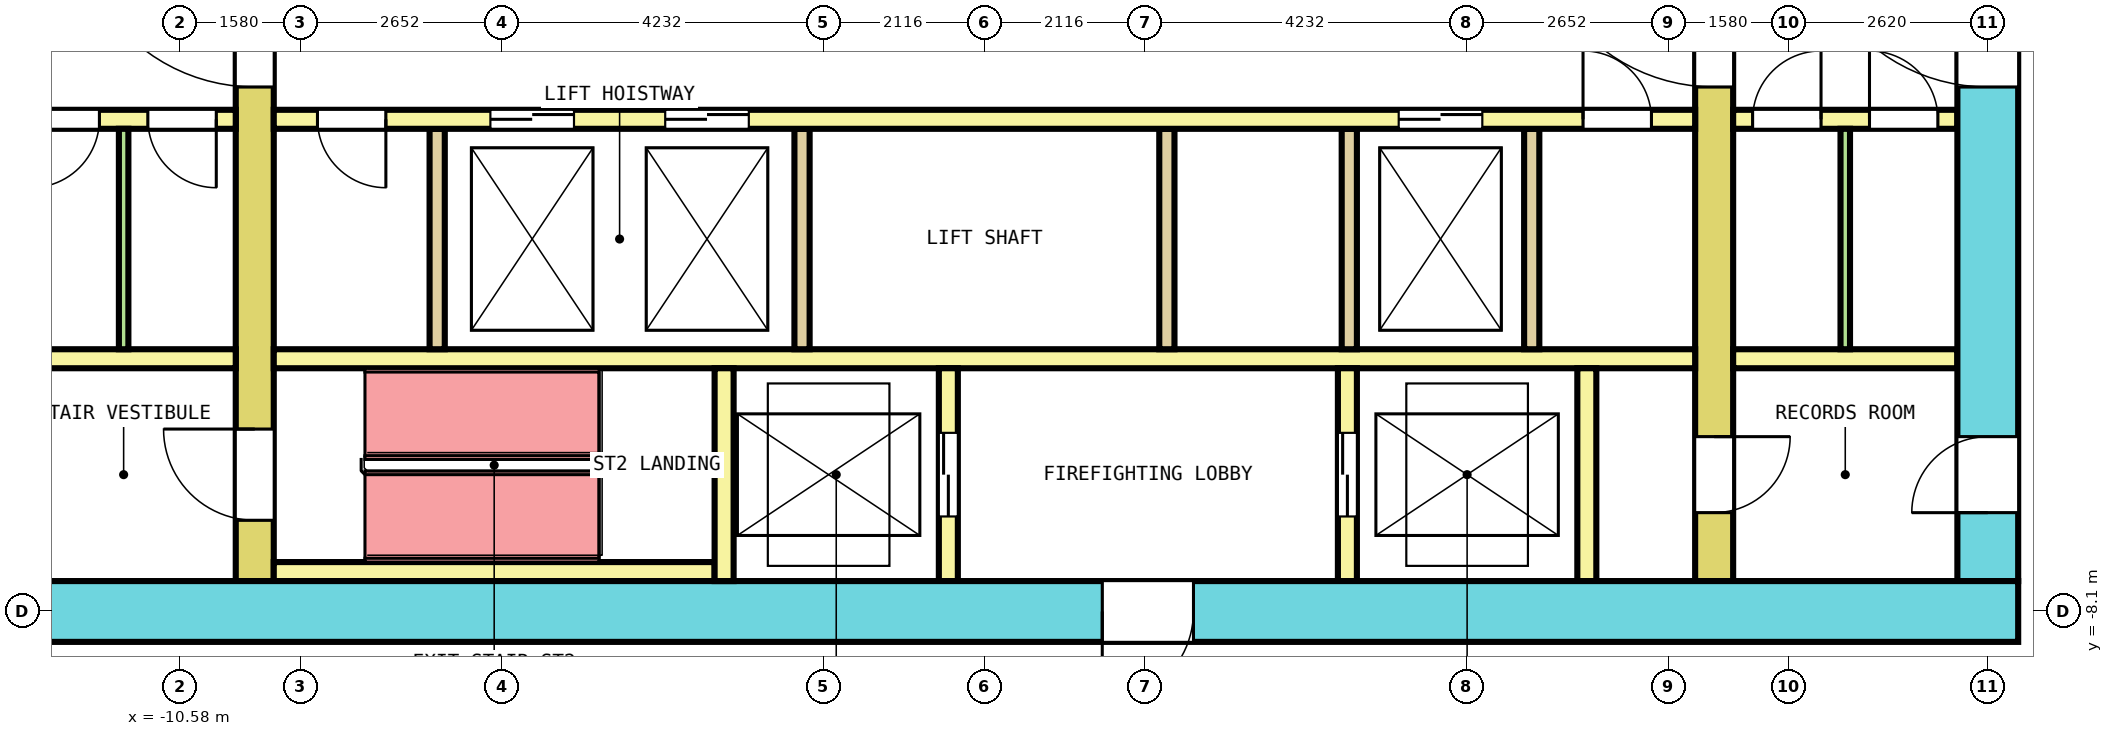
"""IFC4 building model, lengths in metres.
Left out: names, types, materials, properties, quantities, classifications, styles, units other than length and angle.
Written with IfcOpenShell. Run it as: python <this file> out.ifc"""

import sys

from ifc_helpers import new_model, si_unit, direction, frame, frame_2d, origin, place, context, subcontext, project, spatial, rectangle, extrude, element, fill, save


model = new_model("IFC4")
c1 = context("Model", 3, precision=1e-05, world=origin(), true_north=direction((0.0, 1.0)))
c2 = subcontext(c1, "Body", "Model", "MODEL_VIEW")
j1 = project(units=[si_unit("LENGTHUNIT", "METRE"), si_unit("PLANEANGLEUNIT", "RADIAN")], contexts=[c1])
p1 = place(None, origin())
s1 = spatial("IfcSite", under=j1, at=p1, CompositionType="ELEMENT")
p2 = place(p1, origin())
s2 = spatial("IfcBuilding", under=s1, at=p2, CompositionType="ELEMENT")
p3 = place(p2, frame((0.0, 0.0, 122.0)))
s3 = spatial("IfcBuildingStorey", under=s2, at=p3, CompositionType="ELEMENT", Elevation=122.0)
p4 = place(p3, frame((-13.6, -8.1, 0.0), z_axis=(0.0, 0.0, 1.0), x_axis=(1.0, 0.0, 0.0)))
e1 = element("IfcWall", 1, at=p4, inside=s3, PredefinedType="SHEAR", context=c2, shape_type="SweptSolid", body=[
    extrude(rectangle(XDim=27.2, YDim=0.8, at=frame_2d((13.6, 0.0))), origin(), (0.0, 0.0, 1.0), 4.1),
])
p5 = place(p4, frame((15.15, 0.0, 0.0)))
e2 = element("IfcOpeningElement", 2, at=p5, cuts=e1, PredefinedType="OPENING", context=c2, shape_type="SweptSolid", body=[
    extrude(rectangle(XDim=1.2, YDim=2.1, at=frame_2d((0.6, 1.05))), frame((0.0, 0.41, 0.0), z_axis=(0.0, -1.0, 0.0), x_axis=(1.0, 0.0, 0.0)), (0.0, 0.0, 1.0), 0.82),
])
p6 = place(p3, frame((13.2, -7.7, 0.0), z_axis=(0.0, 0.0, 1.0), x_axis=(0.0, 1.0, 0.0)))
e3 = element("IfcWall", 3, at=p6, inside=s3, PredefinedType="SHEAR", context=c2, shape_type="SweptSolid", body=[
    extrude(rectangle(XDim=15.4, YDim=0.8, at=frame_2d((7.7, 0.0))), origin(), (0.0, 0.0, 1.0), 4.1),
])
p7 = place(p6, frame((6.5, 0.0, 0.0)))
e4 = element("IfcOpeningElement", 4, at=p7, cuts=e3, PredefinedType="OPENING", context=c2, shape_type="SweptSolid", body=[
    extrude(rectangle(XDim=2.4, YDim=2.1, at=frame_2d((1.2, 1.05))), frame((0.0, 0.41, 0.0), z_axis=(0.0, -1.0, 0.0), x_axis=(1.0, 0.0, 0.0)), (0.0, 0.0, 1.0), 0.82),
])
p8 = place(p6, frame((13.4, 0.0, 0.0)))
e5 = element("IfcOpeningElement", 5, at=p8, cuts=e3, PredefinedType="OPENING", context=c2, shape_type="SweptSolid", body=[
    extrude(rectangle(XDim=1.2, YDim=2.1, at=frame_2d((0.6, 1.05))), frame((0.0, 0.41, 0.0), z_axis=(0.0, -1.0, 0.0), x_axis=(1.0, 0.0, 0.0)), (0.0, 0.0, 1.0), 0.82),
])
p9 = place(p6, frame((0.9, 0.0, 0.0)))
e6 = element("IfcOpeningElement", 6, at=p9, cuts=e3, PredefinedType="OPENING", context=c2, shape_type="SweptSolid", body=[
    extrude(rectangle(XDim=1.0, YDim=2.1, at=frame_2d((0.5, 1.05))), frame((0.0, 0.41, 0.0), z_axis=(0.0, -1.0, 0.0), x_axis=(1.0, 0.0, 0.0)), (0.0, 0.0, 1.0), 0.82),
])
p10 = place(p3, frame((-9.6, -7.7, 0.0), z_axis=(0.0, 0.0, 1.0), x_axis=(0.0, 1.0, 0.0)))
e7 = element("IfcWall", 7, at=p10, inside=s3, PredefinedType="SHEAR", context=c2, shape_type="SweptSolid", body=[
    extrude(rectangle(XDim=15.4, YDim=0.5, at=frame_2d((7.7, 0.0))), origin(), (0.0, 0.0, 1.0), 4.1),
])
p11 = place(p10, frame((6.5, 0.0, 0.0)))
e8 = element("IfcOpeningElement", 8, at=p11, cuts=e7, PredefinedType="OPENING", context=c2, shape_type="SweptSolid", body=[
    extrude(rectangle(XDim=2.4, YDim=2.1, at=frame_2d((1.2, 1.05))), frame((0.0, 0.26, 0.0), z_axis=(0.0, -1.0, 0.0), x_axis=(1.0, 0.0, 0.0)), (0.0, 0.0, 1.0), 0.52),
])
p12 = place(p10, frame((13.4, 0.0, 0.0)))
e9 = element("IfcOpeningElement", 9, at=p12, cuts=e7, PredefinedType="OPENING", context=c2, shape_type="SweptSolid", body=[
    extrude(rectangle(XDim=1.2, YDim=2.1, at=frame_2d((0.6, 1.05))), frame((0.0, 0.26, 0.0), z_axis=(0.0, -1.0, 0.0), x_axis=(1.0, 0.0, 0.0)), (0.0, 0.0, 1.0), 0.52),
])
p13 = place(p10, frame((0.8, 0.0, 0.0)))
e10 = element("IfcOpeningElement", 10, at=p13, cuts=e7, PredefinedType="OPENING", context=c2, shape_type="SweptSolid", body=[
    extrude(rectangle(XDim=1.2, YDim=2.1, at=frame_2d((0.6, 1.05))), frame((0.0, 0.26, 0.0), z_axis=(0.0, -1.0, 0.0), x_axis=(1.0, 0.0, 0.0)), (0.0, 0.0, 1.0), 0.52),
])
p14 = place(p3, frame((9.6, -7.7, 0.0), z_axis=(0.0, 0.0, 1.0), x_axis=(0.0, 1.0, 0.0)))
e11 = element("IfcWall", 11, at=p14, inside=s3, PredefinedType="SHEAR", context=c2, shape_type="SweptSolid", body=[
    extrude(rectangle(XDim=15.4, YDim=0.5, at=frame_2d((7.7, 0.0))), origin(), (0.0, 0.0, 1.0), 4.1),
])
p15 = place(p14, frame((6.5, 0.0, 0.0)))
e12 = element("IfcOpeningElement", 12, at=p15, cuts=e11, PredefinedType="OPENING", context=c2, shape_type="SweptSolid", body=[
    extrude(rectangle(XDim=2.4, YDim=2.1, at=frame_2d((1.2, 1.05))), frame((0.0, 0.26, 0.0), z_axis=(0.0, -1.0, 0.0), x_axis=(1.0, 0.0, 0.0)), (0.0, 0.0, 1.0), 0.52),
])
p16 = place(p14, frame((13.4, 0.0, 0.0)))
e13 = element("IfcOpeningElement", 13, at=p16, cuts=e11, PredefinedType="OPENING", context=c2, shape_type="SweptSolid", body=[
    extrude(rectangle(XDim=1.2, YDim=2.1, at=frame_2d((0.6, 1.05))), frame((0.0, 0.26, 0.0), z_axis=(0.0, -1.0, 0.0), x_axis=(1.0, 0.0, 0.0)), (0.0, 0.0, 1.0), 0.52),
])
p17 = place(p14, frame((0.9, 0.0, 0.0)))
e14 = element("IfcOpeningElement", 14, at=p17, cuts=e11, PredefinedType="OPENING", context=c2, shape_type="SweptSolid", body=[
    extrude(rectangle(XDim=1.0, YDim=2.1, at=frame_2d((0.5, 1.05))), frame((0.0, 0.26, 0.0), z_axis=(0.0, -1.0, 0.0), x_axis=(1.0, 0.0, 0.0)), (0.0, 0.0, 1.0), 0.52),
])
p18 = place(p3, frame((-12.8, -1.625, 0.0), z_axis=(0.0, 0.0, 1.0), x_axis=(1.0, 0.0, 0.0)))
e15 = element("IfcWall", 15, at=p18, inside=s3, PredefinedType="SOLIDWALL", context=c2, shape_type="SweptSolid", body=[
    extrude(rectangle(XDim=2.95, YDim=0.25, at=frame_2d((1.475, 0.0))), origin(), (0.0, 0.0, 1.0), 4.1),
])
p19 = place(p18, frame((0.256, 0.0, 0.0)))
e16 = element("IfcOpeningElement", 16, at=p19, cuts=e15, PredefinedType="OPENING", context=c2, shape_type="SweptSolid", body=[
    extrude(rectangle(XDim=0.9, YDim=2.1, at=frame_2d((0.45, 1.05))), frame((0.0, 0.135, 0.0), z_axis=(0.0, -1.0, 0.0), x_axis=(1.0, 0.0, 0.0)), (0.0, 0.0, 1.0), 0.27),
])
p20 = place(p18, frame((1.794, 0.0, 0.0)))
e17 = element("IfcOpeningElement", 17, at=p20, cuts=e15, PredefinedType="OPENING", context=c2, shape_type="SweptSolid", body=[
    extrude(rectangle(XDim=0.9, YDim=2.1, at=frame_2d((0.45, 1.05))), frame((0.0, 0.135, 0.0), z_axis=(0.0, -1.0, 0.0), x_axis=(1.0, 0.0, 0.0)), (0.0, 0.0, 1.0), 0.27),
])
p21 = place(p3, frame((-9.35, -1.625, 0.0), z_axis=(0.0, 0.0, 1.0), x_axis=(1.0, 0.0, 0.0)))
e18 = element("IfcWall", 18, at=p21, inside=s3, PredefinedType="SOLIDWALL", context=c2, shape_type="SweptSolid", body=[
    extrude(rectangle(XDim=18.7, YDim=0.25, at=frame_2d((9.35, 0.0))), origin(), (0.0, 0.0, 1.0), 4.1),
])
p22 = place(p21, frame((2.85, 0.0, 0.0)))
e19 = element("IfcOpeningElement", 19, at=p22, cuts=e18, PredefinedType="OPENING", context=c2, shape_type="SweptSolid", body=[
    extrude(rectangle(XDim=1.1, YDim=2.1, at=frame_2d((0.55, 1.05))), frame((0.0, 0.135, 0.0), z_axis=(0.0, -1.0, 0.0), x_axis=(1.0, 0.0, 0.0)), (0.0, 0.0, 1.0), 0.27),
])
p23 = place(p21, frame((5.15, 0.0, 0.0)))
e20 = element("IfcOpeningElement", 20, at=p23, cuts=e18, PredefinedType="OPENING", context=c2, shape_type="SweptSolid", body=[
    extrude(rectangle(XDim=1.1, YDim=2.1, at=frame_2d((0.55, 1.05))), frame((0.0, 0.135, 0.0), z_axis=(0.0, -1.0, 0.0), x_axis=(1.0, 0.0, 0.0)), (0.0, 0.0, 1.0), 0.27),
])
p24 = place(p21, frame((14.8, 0.0, 0.0)))
e21 = element("IfcOpeningElement", 21, at=p24, cuts=e18, PredefinedType="OPENING", context=c2, shape_type="SweptSolid", body=[
    extrude(rectangle(XDim=1.1, YDim=2.1, at=frame_2d((0.55, 1.05))), frame((0.0, 0.135, 0.0), z_axis=(0.0, -1.0, 0.0), x_axis=(1.0, 0.0, 0.0)), (0.0, 0.0, 1.0), 0.27),
])
p25 = place(p21, frame((0.575, 0.0, 0.0)))
e22 = element("IfcOpeningElement", 22, at=p25, cuts=e18, PredefinedType="OPENING", context=c2, shape_type="SweptSolid", body=[
    extrude(rectangle(XDim=0.9, YDim=2.1, at=frame_2d((0.45, 1.05))), frame((0.0, 0.135, 0.0), z_axis=(0.0, -1.0, 0.0), x_axis=(1.0, 0.0, 0.0)), (0.0, 0.0, 1.0), 0.27),
])
p26 = place(p21, frame((17.225, 0.0, 0.0)))
e23 = element("IfcOpeningElement", 23, at=p26, cuts=e18, PredefinedType="OPENING", context=c2, shape_type="SweptSolid", body=[
    extrude(rectangle(XDim=0.9, YDim=2.1, at=frame_2d((0.45, 1.05))), frame((0.0, 0.135, 0.0), z_axis=(0.0, -1.0, 0.0), x_axis=(1.0, 0.0, 0.0)), (0.0, 0.0, 1.0), 0.27),
])
p27 = place(p3, frame((9.85, -1.625, 0.0), z_axis=(0.0, 0.0, 1.0), x_axis=(1.0, 0.0, 0.0)))
e24 = element("IfcWall", 24, at=p27, inside=s3, PredefinedType="SOLIDWALL", context=c2, shape_type="SweptSolid", body=[
    extrude(rectangle(XDim=2.95, YDim=0.25, at=frame_2d((1.475, 0.0))), origin(), (0.0, 0.0, 1.0), 4.1),
])
p28 = place(p27, frame((0.256, 0.0, 0.0)))
e25 = element("IfcOpeningElement", 25, at=p28, cuts=e24, PredefinedType="OPENING", context=c2, shape_type="SweptSolid", body=[
    extrude(rectangle(XDim=0.9, YDim=2.1, at=frame_2d((0.45, 1.05))), frame((0.0, 0.135, 0.0), z_axis=(0.0, -1.0, 0.0), x_axis=(1.0, 0.0, 0.0)), (0.0, 0.0, 1.0), 0.27),
])
p29 = place(p27, frame((1.794, 0.0, 0.0)))
e26 = element("IfcOpeningElement", 26, at=p29, cuts=e24, PredefinedType="OPENING", context=c2, shape_type="SweptSolid", body=[
    extrude(rectangle(XDim=0.9, YDim=2.1, at=frame_2d((0.45, 1.05))), frame((0.0, 0.135, 0.0), z_axis=(0.0, -1.0, 0.0), x_axis=(1.0, 0.0, 0.0)), (0.0, 0.0, 1.0), 0.27),
])
p30 = place(p3, frame((-12.8, -4.775, 0.0), z_axis=(0.0, 0.0, 1.0), x_axis=(1.0, 0.0, 0.0)))
e27 = element("IfcWall", 27, at=p30, inside=s3, PredefinedType="SOLIDWALL", context=c2, shape_type="SweptSolid", body=[
    extrude(rectangle(XDim=2.95, YDim=0.25, at=frame_2d((1.475, 0.0))), origin(), (0.0, 0.0, 1.0), 4.1),
])
p31 = place(p3, frame((-9.35, -4.775, 0.0), z_axis=(0.0, 0.0, 1.0), x_axis=(1.0, 0.0, 0.0)))
e28 = element("IfcWall", 28, at=p31, inside=s3, PredefinedType="SOLIDWALL", context=c2, shape_type="SweptSolid", body=[
    extrude(rectangle(XDim=18.7, YDim=0.25, at=frame_2d((9.35, 0.0))), origin(), (0.0, 0.0, 1.0), 4.1),
])
p32 = place(p3, frame((9.85, -4.775, 0.0), z_axis=(0.0, 0.0, 1.0), x_axis=(1.0, 0.0, 0.0)))
e29 = element("IfcWall", 29, at=p32, inside=s3, PredefinedType="SOLIDWALL", context=c2, shape_type="SweptSolid", body=[
    extrude(rectangle(XDim=2.95, YDim=0.25, at=frame_2d((1.475, 0.0))), origin(), (0.0, 0.0, 1.0), 4.1),
])
for number, where, z_axis, x_axis in (
    (30, (-7.2, -4.65, 0.0), (0.0, 0.0, 1.0), (0.0, 1.0, 0.0)),
    (31, (-2.4, -4.65, 0.0), (0.0, 0.0, 1.0), (0.0, 1.0, 0.0)),
    (32, (2.4, -4.65, 0.0), (0.0, 0.0, 1.0), (0.0, 1.0, 0.0)),
    (33, (4.8, -4.65, 0.0), (0.0, 0.0, 1.0), (0.0, 1.0, 0.0)),
    (34, (7.2, -4.65, 0.0), (0.0, 0.0, 1.0), (0.0, 1.0, 0.0)),
):
    element("IfcWall", number, at=place(p3, frame(where, z_axis=z_axis, x_axis=x_axis)), inside=s3, PredefinedType="SOLIDWALL", context=c2, shape_type="SweptSolid", body=[
        extrude(rectangle(XDim=2.9, YDim=0.2, at=frame_2d((1.45, 0.0))), origin(), (0.0, 0.0, 1.0), 4.1),
    ])
p33 = place(p3, frame((-9.35, -7.575, 0.0), z_axis=(0.0, 0.0, 1.0), x_axis=(1.0, 0.0, 0.0)))
e35 = element("IfcWall", 35, at=p33, inside=s3, PredefinedType="SOLIDWALL", context=c2, shape_type="SweptSolid", body=[
    extrude(rectangle(XDim=5.8, YDim=0.25, at=frame_2d((2.9, 0.0))), origin(), (0.0, 0.0, 1.0), 4.1),
])
p34 = place(p3, frame((-3.425, -7.7, 0.0), z_axis=(0.0, 0.0, 1.0), x_axis=(0.0, 1.0, 0.0)))
e36 = element("IfcWall", 36, at=p34, inside=s3, PredefinedType="SOLIDWALL", context=c2, shape_type="SweptSolid", body=[
    extrude(rectangle(XDim=2.8, YDim=0.25, at=frame_2d((1.4, 0.0))), origin(), (0.0, 0.0, 1.0), 4.1),
])
p35 = place(p3, frame((-0.475, -7.7, 0.0), z_axis=(0.0, 0.0, 1.0), x_axis=(0.0, 1.0, 0.0)))
e37 = element("IfcWall", 37, at=p35, inside=s3, PredefinedType="SOLIDWALL", context=c2, shape_type="SweptSolid", body=[
    extrude(rectangle(XDim=2.8, YDim=0.25, at=frame_2d((1.4, 0.0))), origin(), (0.0, 0.0, 1.0), 4.1),
])
p36 = place(p35, frame((0.85, 0.0, 0.0)))
e38 = element("IfcOpeningElement", 38, at=p36, cuts=e37, PredefinedType="OPENING", context=c2, shape_type="SweptSolid", body=[
    extrude(rectangle(XDim=1.1, YDim=2.1, at=frame_2d((0.55, 1.05))), frame((0.0, 0.135, 0.0), z_axis=(0.0, -1.0, 0.0), x_axis=(1.0, 0.0, 0.0)), (0.0, 0.0, 1.0), 0.27),
])
p37 = place(p3, frame((4.775, -7.7, 0.0), z_axis=(0.0, 0.0, 1.0), x_axis=(0.0, 1.0, 0.0)))
e39 = element("IfcWall", 39, at=p37, inside=s3, PredefinedType="SOLIDWALL", context=c2, shape_type="SweptSolid", body=[
    extrude(rectangle(XDim=2.8, YDim=0.25, at=frame_2d((1.4, 0.0))), origin(), (0.0, 0.0, 1.0), 4.1),
])
p38 = place(p37, frame((0.85, 0.0, 0.0)))
e40 = element("IfcOpeningElement", 40, at=p38, cuts=e39, PredefinedType="OPENING", context=c2, shape_type="SweptSolid", body=[
    extrude(rectangle(XDim=1.1, YDim=2.1, at=frame_2d((0.55, 1.05))), frame((0.0, 0.135, 0.0), z_axis=(0.0, -1.0, 0.0), x_axis=(1.0, 0.0, 0.0)), (0.0, 0.0, 1.0), 0.27),
])
p39 = place(p3, frame((7.925, -7.7, 0.0), z_axis=(0.0, 0.0, 1.0), x_axis=(0.0, 1.0, 0.0)))
e41 = element("IfcWall", 41, at=p39, inside=s3, PredefinedType="SOLIDWALL", context=c2, shape_type="SweptSolid", body=[
    extrude(rectangle(XDim=2.8, YDim=0.25, at=frame_2d((1.4, 0.0))), origin(), (0.0, 0.0, 1.0), 4.1),
])
for number, where, z_axis, x_axis in (
    (42, (-11.325, -4.65, 0.0), (0.0, 0.0, 1.0), (0.0, 1.0, 0.0)),
    (43, (11.325, -4.65, 0.0), (0.0, 0.0, 1.0), (0.0, 1.0, 0.0)),
):
    element("IfcWall", number, at=place(p3, frame(where, z_axis=z_axis, x_axis=x_axis)), inside=s3, PredefinedType="PARTITIONING", context=c2, shape_type="SweptSolid", body=[
        extrude(rectangle(XDim=2.9, YDim=0.125, at=frame_2d((1.45, 0.0))), origin(), (0.0, 0.0, 1.0), 4.1),
    ])
p40 = place(p22, origin())
e44 = element("IfcDoor", 44, at=p40, inside=s3, OperationType="DOUBLE_DOOR_SLIDING", PredefinedType="DOOR", context=c2, shape_type="SweptSolid", body=[
    extrude(rectangle(XDim=1.1, YDim=2.1, at=frame_2d((0.55, 1.05))), frame((0.0, 0.075, 0.0), z_axis=(0.0, -1.0, 0.0), x_axis=(1.0, 0.0, 0.0)), (0.0, 0.0, 1.0), 0.15),
])
fill(e19, e44)
p41 = place(p23, origin())
e45 = element("IfcDoor", 45, at=p41, inside=s3, OperationType="DOUBLE_DOOR_SLIDING", PredefinedType="DOOR", context=c2, shape_type="SweptSolid", body=[
    extrude(rectangle(XDim=1.1, YDim=2.1, at=frame_2d((0.55, 1.05))), frame((0.0, 0.075, 0.0), z_axis=(0.0, -1.0, 0.0), x_axis=(1.0, 0.0, 0.0)), (0.0, 0.0, 1.0), 0.15),
])
fill(e20, e45)
p42 = place(p24, origin())
e46 = element("IfcDoor", 46, at=p42, inside=s3, OperationType="DOUBLE_DOOR_SLIDING", PredefinedType="DOOR", context=c2, shape_type="SweptSolid", body=[
    extrude(rectangle(XDim=1.1, YDim=2.1, at=frame_2d((0.55, 1.05))), frame((0.0, 0.075, 0.0), z_axis=(0.0, -1.0, 0.0), x_axis=(1.0, 0.0, 0.0)), (0.0, 0.0, 1.0), 0.15),
])
fill(e21, e46)
p43 = place(p36, origin())
e47 = element("IfcDoor", 47, at=p43, inside=s3, OperationType="DOUBLE_DOOR_SLIDING", PredefinedType="DOOR", context=c2, shape_type="SweptSolid", body=[
    extrude(rectangle(XDim=1.1, YDim=2.1, at=frame_2d((0.55, 1.05))), frame((0.0, 0.075, 0.0), z_axis=(0.0, -1.0, 0.0), x_axis=(1.0, 0.0, 0.0)), (0.0, 0.0, 1.0), 0.15),
])
fill(e38, e47)
p44 = place(p38, origin())
e48 = element("IfcDoor", 48, at=p44, inside=s3, OperationType="DOUBLE_DOOR_SLIDING", PredefinedType="DOOR", context=c2, shape_type="SweptSolid", body=[
    extrude(rectangle(XDim=1.1, YDim=2.1, at=frame_2d((0.55, 1.05))), frame((0.0, 0.075, 0.0), z_axis=(0.0, -1.0, 0.0), x_axis=(1.0, 0.0, 0.0)), (0.0, 0.0, 1.0), 0.15),
])
fill(e40, e48)
p45 = place(p11, origin())
e49 = element("IfcDoor", 49, at=p45, inside=s3, OperationType="DOUBLE_DOOR_SINGLE_SWING", PredefinedType="DOOR", context=c2, shape_type="SweptSolid", body=[
    extrude(rectangle(XDim=2.4, YDim=2.1, at=frame_2d((1.2, 1.05))), frame((0.0, 0.2, 0.0), z_axis=(0.0, -1.0, 0.0), x_axis=(1.0, 0.0, 0.0)), (0.0, 0.0, 1.0), 0.4),
])
fill(e8, e49)
p46 = place(p15, origin())
e50 = element("IfcDoor", 50, at=p46, inside=s3, OperationType="DOUBLE_DOOR_SINGLE_SWING", PredefinedType="DOOR", context=c2, shape_type="SweptSolid", body=[
    extrude(rectangle(XDim=2.4, YDim=2.1, at=frame_2d((1.2, 1.05))), frame((0.0, 0.2, 0.0), z_axis=(0.0, -1.0, 0.0), x_axis=(1.0, 0.0, 0.0)), (0.0, 0.0, 1.0), 0.4),
])
fill(e12, e50)
p47 = place(p7, origin())
e51 = element("IfcDoor", 51, at=p47, inside=s3, OperationType="DOUBLE_DOOR_SINGLE_SWING", PredefinedType="DOOR", context=c2, shape_type="SweptSolid", body=[
    extrude(rectangle(XDim=2.4, YDim=2.1, at=frame_2d((1.2, 1.05))), frame((0.0, 0.3, 0.0), z_axis=(0.0, -1.0, 0.0), x_axis=(1.0, 0.0, 0.0)), (0.0, 0.0, 1.0), 0.6),
])
fill(e4, e51)
p48 = place(p13, origin())
e52 = element("IfcDoor", 52, at=p48, inside=s3, OperationType="SINGLE_SWING_RIGHT", PredefinedType="DOOR", context=c2, shape_type="SweptSolid", body=[
    extrude(rectangle(XDim=1.2, YDim=2.1, at=frame_2d((0.6, 1.05))), frame((0.0, 0.2, 0.0), z_axis=(0.0, -1.0, 0.0), x_axis=(1.0, 0.0, 0.0)), (0.0, 0.0, 1.0), 0.4),
])
fill(e10, e52)
p49 = place(p5, origin())
e53 = element("IfcDoor", 53, at=p49, inside=s3, OperationType="SINGLE_SWING_RIGHT", PredefinedType="DOOR", context=c2, shape_type="SweptSolid", body=[
    extrude(rectangle(XDim=1.2, YDim=2.1, at=frame_2d((0.6, 1.05))), frame((0.0, 0.3, 0.0), z_axis=(0.0, -1.0, 0.0), x_axis=(1.0, 0.0, 0.0)), (0.0, 0.0, 1.0), 0.6),
])
fill(e2, e53)
p50 = place(p17, origin())
e54 = element("IfcDoor", 54, at=p50, inside=s3, OperationType="SINGLE_SWING_RIGHT", PredefinedType="DOOR", context=c2, shape_type="SweptSolid", body=[
    extrude(rectangle(XDim=1.0, YDim=2.1, at=frame_2d((0.5, 1.05))), frame((0.0, 0.2, 0.0), z_axis=(0.0, -1.0, 0.0), x_axis=(1.0, 0.0, 0.0)), (0.0, 0.0, 1.0), 0.4),
])
fill(e14, e54)
p51 = place(p9, origin())
e55 = element("IfcDoor", 55, at=p51, inside=s3, OperationType="SINGLE_SWING_LEFT", PredefinedType="DOOR", context=c2, shape_type="SweptSolid", body=[
    extrude(rectangle(XDim=1.0, YDim=2.1, at=frame_2d((0.5, 1.05))), frame((0.0, 0.3, 0.0), z_axis=(0.0, -1.0, 0.0), x_axis=(1.0, 0.0, 0.0)), (0.0, 0.0, 1.0), 0.6),
])
fill(e6, e55)
p52 = place(p19, origin())
e56 = element("IfcDoor", 56, at=p52, inside=s3, OperationType="SINGLE_SWING_RIGHT", PredefinedType="DOOR", context=c2, shape_type="SweptSolid", body=[
    extrude(rectangle(XDim=0.9, YDim=2.1, at=frame_2d((0.45, 1.05))), frame((0.0, 0.075, 0.0), z_axis=(0.0, -1.0, 0.0), x_axis=(1.0, 0.0, 0.0)), (0.0, 0.0, 1.0), 0.15),
])
fill(e16, e56)
p53 = place(p20, origin())
e57 = element("IfcDoor", 57, at=p53, inside=s3, OperationType="SINGLE_SWING_LEFT", PredefinedType="DOOR", context=c2, shape_type="SweptSolid", body=[
    extrude(rectangle(XDim=0.9, YDim=2.1, at=frame_2d((0.45, 1.05))), frame((0.0, 0.075, 0.0), z_axis=(0.0, -1.0, 0.0), x_axis=(1.0, 0.0, 0.0)), (0.0, 0.0, 1.0), 0.15),
])
fill(e17, e57)
p54 = place(p25, origin())
e58 = element("IfcDoor", 58, at=p54, inside=s3, OperationType="SINGLE_SWING_RIGHT", PredefinedType="DOOR", context=c2, shape_type="SweptSolid", body=[
    extrude(rectangle(XDim=0.9, YDim=2.1, at=frame_2d((0.45, 1.05))), frame((0.0, 0.075, 0.0), z_axis=(0.0, -1.0, 0.0), x_axis=(1.0, 0.0, 0.0)), (0.0, 0.0, 1.0), 0.15),
])
fill(e22, e58)
p55 = place(p26, origin())
e59 = element("IfcDoor", 59, at=p55, inside=s3, OperationType="SINGLE_SWING_LEFT", PredefinedType="DOOR", context=c2, shape_type="SweptSolid", body=[
    extrude(rectangle(XDim=0.9, YDim=2.1, at=frame_2d((0.45, 1.05))), frame((0.0, 0.075, 0.0), z_axis=(0.0, -1.0, 0.0), x_axis=(1.0, 0.0, 0.0)), (0.0, 0.0, 1.0), 0.15),
])
fill(e23, e59)
p56 = place(p28, origin())
e60 = element("IfcDoor", 60, at=p56, inside=s3, OperationType="SINGLE_SWING_RIGHT", PredefinedType="DOOR", context=c2, shape_type="SweptSolid", body=[
    extrude(rectangle(XDim=0.9, YDim=2.1, at=frame_2d((0.45, 1.05))), frame((0.0, 0.075, 0.0), z_axis=(0.0, -1.0, 0.0), x_axis=(1.0, 0.0, 0.0)), (0.0, 0.0, 1.0), 0.15),
])
fill(e25, e60)
p57 = place(p29, origin())
e61 = element("IfcDoor", 61, at=p57, inside=s3, OperationType="SINGLE_SWING_LEFT", PredefinedType="DOOR", context=c2, shape_type="SweptSolid", body=[
    extrude(rectangle(XDim=0.9, YDim=2.1, at=frame_2d((0.45, 1.05))), frame((0.0, 0.075, 0.0), z_axis=(0.0, -1.0, 0.0), x_axis=(1.0, 0.0, 0.0)), (0.0, 0.0, 1.0), 0.15),
])
fill(e26, e61)
save(model, sys.argv[1])
